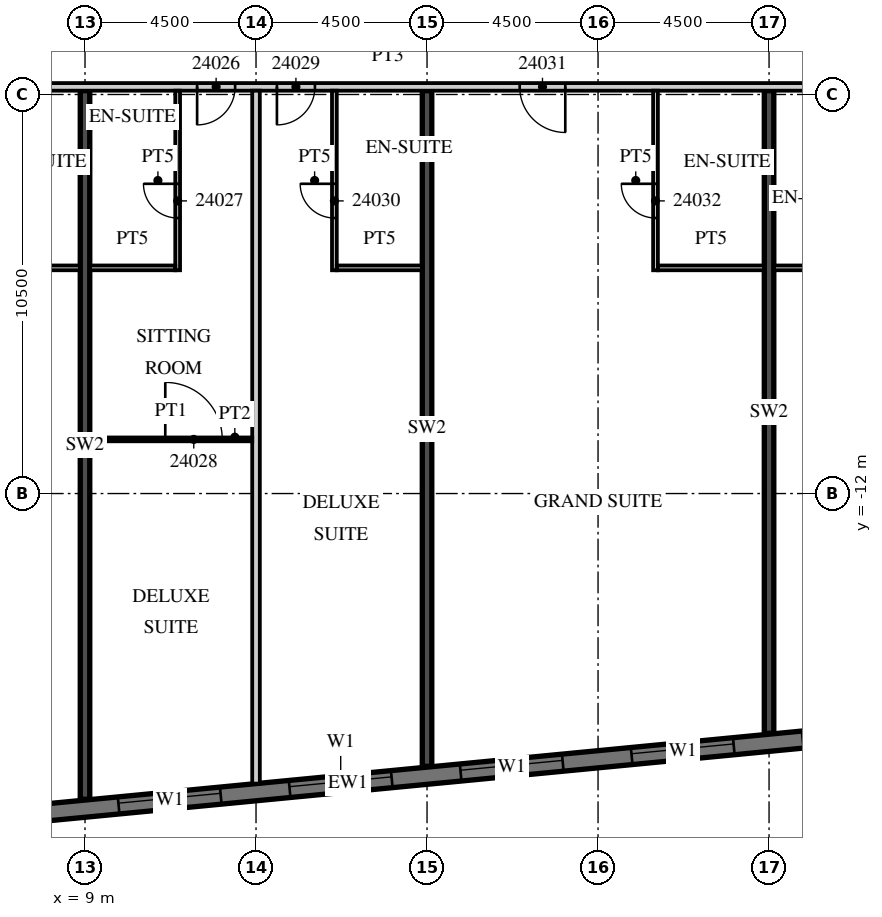
"""IFC4 building model, lengths in metres.
Left out: names, types, materials, properties, quantities, classifications, styles, units other than length and angle.
Written with IfcOpenShell. Run it as: python <this file> out.ifc"""

import sys

from ifc_helpers import new_model, si_unit, direction, frame, frame_2d, origin, place, context, subcontext, project, spatial, rectangle, extrude, element, fill, save


model = new_model("IFC4")
c1 = context("Model", 3, precision=1e-05, world=origin(), true_north=direction((0.0, 1.0)))
c2 = subcontext(c1, "Body", "Model", "MODEL_VIEW")
j1 = project(units=[si_unit("LENGTHUNIT", "METRE"), si_unit("PLANEANGLEUNIT", "RADIAN")], contexts=[c1])
p1 = place(None, origin())
s1 = spatial("IfcSite", under=j1, at=p1, CompositionType="ELEMENT")
p2 = place(p1, origin())
s2 = spatial("IfcBuilding", under=s1, at=p2, CompositionType="ELEMENT")
p3 = place(p2, frame((0.0, 0.0, 114.1)))
s3 = spatial("IfcBuildingStorey", under=s2, at=p3, CompositionType="ELEMENT", Elevation=114.1)
p4 = place(p3, frame((9.0, -20.044, 0.0), z_axis=(0.0, 0.0, 1.0), x_axis=(0.0, 1.0, 0.0)))
e1 = element("IfcWall", 1, at=p4, inside=s3, PredefinedType="SHEAR", context=c2, shape_type="SweptSolid", body=[
    extrude(rectangle(XDim=18.644, YDim=0.25, at=frame_2d((9.322, 0.0))), origin(), (0.0, 0.0, 1.0), 3.3),
])
p5 = place(p3, frame((18.0, -19.177, 0.0), z_axis=(0.0, 0.0, 1.0), x_axis=(0.0, 1.0, 0.0)))
e2 = element("IfcWall", 2, at=p5, inside=s3, PredefinedType="SHEAR", context=c2, shape_type="SweptSolid", body=[
    extrude(rectangle(XDim=17.777, YDim=0.25, at=frame_2d((8.889, 0.0))), origin(), (0.0, 0.0, 1.0), 3.3),
])
p6 = place(p3, frame((27.0, -18.311, 0.0), z_axis=(0.0, 0.0, 1.0), x_axis=(0.0, 1.0, 0.0)))
e3 = element("IfcWall", 3, at=p6, inside=s3, PredefinedType="SHEAR", context=c2, shape_type="SweptSolid", body=[
    extrude(rectangle(XDim=16.911, YDim=0.25, at=frame_2d((8.455, 0.0))), origin(), (0.0, 0.0, 1.0), 3.3),
])
p7 = place(p3, frame((-13.521, -22.46, 0.0), z_axis=(0.0, 0.0, 1.0), x_axis=(0.995396096335, 0.095846812164, 0.0)))
e4 = element("IfcWall", 4, at=p7, inside=s3, PredefinedType="SOLIDWALL", context=c2, shape_type="SweptSolid", body=[
    extrude(rectangle(XDim=59.151, YDim=0.45, at=frame_2d((29.575, 0.0))), origin(), (0.0, 0.0, 1.0), 3.02),
])
p8 = place(p7, frame((0.91, 0.0, 0.45)))
e5 = element("IfcOpeningElement", 5, at=p8, cuts=e4, PredefinedType="OPENING", context=c2, shape_type="SweptSolid", body=[
    extrude(rectangle(XDim=2.7, YDim=2.25, at=frame_2d((1.35, 1.125))), frame((0.0, 0.235, 0.0), z_axis=(0.0, -1.0, 0.0), x_axis=(1.0, 0.0, 0.0)), (0.0, 0.0, 1.0), 0.47),
])
p9 = place(p7, frame((5.431, 0.0, 0.45)))
e6 = element("IfcOpeningElement", 6, at=p9, cuts=e4, PredefinedType="OPENING", context=c2, shape_type="SweptSolid", body=[
    extrude(rectangle(XDim=2.7, YDim=2.25, at=frame_2d((1.35, 1.125))), frame((0.0, 0.235, 0.0), z_axis=(0.0, -1.0, 0.0), x_axis=(1.0, 0.0, 0.0)), (0.0, 0.0, 1.0), 0.47),
])
p10 = place(p7, frame((9.952, 0.0, 0.45)))
e7 = element("IfcOpeningElement", 7, at=p10, cuts=e4, PredefinedType="OPENING", context=c2, shape_type="SweptSolid", body=[
    extrude(rectangle(XDim=2.7, YDim=2.25, at=frame_2d((1.35, 1.125))), frame((0.0, 0.235, 0.0), z_axis=(0.0, -1.0, 0.0), x_axis=(1.0, 0.0, 0.0)), (0.0, 0.0, 1.0), 0.47),
])
p11 = place(p7, frame((14.473, 0.0, 0.45)))
e8 = element("IfcOpeningElement", 8, at=p11, cuts=e4, PredefinedType="OPENING", context=c2, shape_type="SweptSolid", body=[
    extrude(rectangle(XDim=2.7, YDim=2.25, at=frame_2d((1.35, 1.125))), frame((0.0, 0.235, 0.0), z_axis=(0.0, -1.0, 0.0), x_axis=(1.0, 0.0, 0.0)), (0.0, 0.0, 1.0), 0.47),
])
p12 = place(p7, frame((18.994, 0.0, 0.45)))
e9 = element("IfcOpeningElement", 9, at=p12, cuts=e4, PredefinedType="OPENING", context=c2, shape_type="SweptSolid", body=[
    extrude(rectangle(XDim=2.7, YDim=2.25, at=frame_2d((1.35, 1.125))), frame((0.0, 0.235, 0.0), z_axis=(0.0, -1.0, 0.0), x_axis=(1.0, 0.0, 0.0)), (0.0, 0.0, 1.0), 0.47),
])
p13 = place(p7, frame((23.514, 0.0, 0.45)))
e10 = element("IfcOpeningElement", 10, at=p13, cuts=e4, PredefinedType="OPENING", context=c2, shape_type="SweptSolid", body=[
    extrude(rectangle(XDim=2.7, YDim=2.25, at=frame_2d((1.35, 1.125))), frame((0.0, 0.235, 0.0), z_axis=(0.0, -1.0, 0.0), x_axis=(1.0, 0.0, 0.0)), (0.0, 0.0, 1.0), 0.47),
])
p14 = place(p7, frame((28.035, 0.0, 0.45)))
e11 = element("IfcOpeningElement", 11, at=p14, cuts=e4, PredefinedType="OPENING", context=c2, shape_type="SweptSolid", body=[
    extrude(rectangle(XDim=2.7, YDim=2.25, at=frame_2d((1.35, 1.125))), frame((0.0, 0.235, 0.0), z_axis=(0.0, -1.0, 0.0), x_axis=(1.0, 0.0, 0.0)), (0.0, 0.0, 1.0), 0.47),
])
p15 = place(p7, frame((32.556, 0.0, 0.45)))
e12 = element("IfcOpeningElement", 12, at=p15, cuts=e4, PredefinedType="OPENING", context=c2, shape_type="SweptSolid", body=[
    extrude(rectangle(XDim=2.7, YDim=2.25, at=frame_2d((1.35, 1.125))), frame((0.0, 0.235, 0.0), z_axis=(0.0, -1.0, 0.0), x_axis=(1.0, 0.0, 0.0)), (0.0, 0.0, 1.0), 0.47),
])
p16 = place(p7, frame((37.077, 0.0, 0.45)))
e13 = element("IfcOpeningElement", 13, at=p16, cuts=e4, PredefinedType="OPENING", context=c2, shape_type="SweptSolid", body=[
    extrude(rectangle(XDim=2.7, YDim=2.25, at=frame_2d((1.35, 1.125))), frame((0.0, 0.235, 0.0), z_axis=(0.0, -1.0, 0.0), x_axis=(1.0, 0.0, 0.0)), (0.0, 0.0, 1.0), 0.47),
])
p17 = place(p7, frame((41.598, 0.0, 0.45)))
e14 = element("IfcOpeningElement", 14, at=p17, cuts=e4, PredefinedType="OPENING", context=c2, shape_type="SweptSolid", body=[
    extrude(rectangle(XDim=2.7, YDim=2.25, at=frame_2d((1.35, 1.125))), frame((0.0, 0.235, 0.0), z_axis=(0.0, -1.0, 0.0), x_axis=(1.0, 0.0, 0.0)), (0.0, 0.0, 1.0), 0.47),
])
p18 = place(p7, frame((46.118, 0.0, 0.45)))
e15 = element("IfcOpeningElement", 15, at=p18, cuts=e4, PredefinedType="OPENING", context=c2, shape_type="SweptSolid", body=[
    extrude(rectangle(XDim=2.7, YDim=2.25, at=frame_2d((1.35, 1.125))), frame((0.0, 0.235, 0.0), z_axis=(0.0, -1.0, 0.0), x_axis=(1.0, 0.0, 0.0)), (0.0, 0.0, 1.0), 0.47),
])
p19 = place(p7, frame((50.639, 0.0, 0.45)))
e16 = element("IfcOpeningElement", 16, at=p19, cuts=e4, PredefinedType="OPENING", context=c2, shape_type="SweptSolid", body=[
    extrude(rectangle(XDim=2.7, YDim=2.25, at=frame_2d((1.35, 1.125))), frame((0.0, 0.235, 0.0), z_axis=(0.0, -1.0, 0.0), x_axis=(1.0, 0.0, 0.0)), (0.0, 0.0, 1.0), 0.47),
])
p20 = place(p7, frame((55.15, 0.0, 0.45)))
e17 = element("IfcOpeningElement", 17, at=p20, cuts=e4, PredefinedType="OPENING", context=c2, shape_type="SweptSolid", body=[
    extrude(rectangle(XDim=2.7, YDim=2.25, at=frame_2d((1.35, 1.125))), frame((0.0, 0.235, 0.0), z_axis=(0.0, -1.0, 0.0), x_axis=(1.0, 0.0, 0.0)), (0.0, 0.0, 1.0), 0.47),
])
p21 = place(p3, frame((-13.5, -1.3, 0.0), z_axis=(0.0, 0.0, 1.0), x_axis=(1.0, 0.0, 0.0)))
e18 = element("IfcWall", 18, at=p21, inside=s3, PredefinedType="PARTITIONING", context=c2, shape_type="SweptSolid", body=[
    extrude(rectangle(XDim=60.932, YDim=0.2, at=frame_2d((30.466, 0.0))), origin(), (0.0, 0.0, 1.0), 3.02),
])
p22 = place(p21, frame((0.575, 0.0, 0.0)))
e19 = element("IfcOpeningElement", 19, at=p22, cuts=e18, PredefinedType="OPENING", context=c2, shape_type="SweptSolid", body=[
    extrude(rectangle(XDim=1.0, YDim=2.1, at=frame_2d((0.5, 1.05))), frame((0.0, 0.11, 0.0), z_axis=(0.0, -1.0, 0.0), x_axis=(1.0, 0.0, 0.0)), (0.0, 0.0, 1.0), 0.22),
])
p23 = place(p21, frame((5.075, 0.0, 0.0)))
e20 = element("IfcOpeningElement", 20, at=p23, cuts=e18, PredefinedType="OPENING", context=c2, shape_type="SweptSolid", body=[
    extrude(rectangle(XDim=1.0, YDim=2.1, at=frame_2d((0.5, 1.05))), frame((0.0, 0.11, 0.0), z_axis=(0.0, -1.0, 0.0), x_axis=(1.0, 0.0, 0.0)), (0.0, 0.0, 1.0), 0.22),
])
p24 = place(p21, frame((11.925, 0.0, 0.0)))
e21 = element("IfcOpeningElement", 21, at=p24, cuts=e18, PredefinedType="OPENING", context=c2, shape_type="SweptSolid", body=[
    extrude(rectangle(XDim=1.0, YDim=2.1, at=frame_2d((0.5, 1.05))), frame((0.0, 0.11, 0.0), z_axis=(0.0, -1.0, 0.0), x_axis=(1.0, 0.0, 0.0)), (0.0, 0.0, 1.0), 0.22),
])
p25 = place(p21, frame((15.938, 0.0, 0.0)))
e22 = element("IfcOpeningElement", 22, at=p25, cuts=e18, PredefinedType="OPENING", context=c2, shape_type="SweptSolid", body=[
    extrude(rectangle(XDim=1.2, YDim=2.1, at=frame_2d((0.6, 1.05))), frame((0.0, 0.11, 0.0), z_axis=(0.0, -1.0, 0.0), x_axis=(1.0, 0.0, 0.0)), (0.0, 0.0, 1.0), 0.22),
])
p26 = place(p21, frame((25.45, 0.0, 0.0)))
e23 = element("IfcOpeningElement", 23, at=p26, cuts=e18, PredefinedType="OPENING", context=c2, shape_type="SweptSolid", body=[
    extrude(rectangle(XDim=1.0, YDim=2.1, at=frame_2d((0.5, 1.05))), frame((0.0, 0.11, 0.0), z_axis=(0.0, -1.0, 0.0), x_axis=(1.0, 0.0, 0.0)), (0.0, 0.0, 1.0), 0.22),
])
p27 = place(p21, frame((27.55, 0.0, 0.0)))
e24 = element("IfcOpeningElement", 24, at=p27, cuts=e18, PredefinedType="OPENING", context=c2, shape_type="SweptSolid", body=[
    extrude(rectangle(XDim=1.0, YDim=2.1, at=frame_2d((0.5, 1.05))), frame((0.0, 0.11, 0.0), z_axis=(0.0, -1.0, 0.0), x_axis=(1.0, 0.0, 0.0)), (0.0, 0.0, 1.0), 0.22),
])
p28 = place(p21, frame((33.938, 0.0, 0.0)))
e25 = element("IfcOpeningElement", 25, at=p28, cuts=e18, PredefinedType="OPENING", context=c2, shape_type="SweptSolid", body=[
    extrude(rectangle(XDim=1.2, YDim=2.1, at=frame_2d((0.6, 1.05))), frame((0.0, 0.11, 0.0), z_axis=(0.0, -1.0, 0.0), x_axis=(1.0, 0.0, 0.0)), (0.0, 0.0, 1.0), 0.22),
])
p29 = place(p21, frame((45.862, 0.0, 0.0)))
e26 = element("IfcOpeningElement", 26, at=p29, cuts=e18, PredefinedType="OPENING", context=c2, shape_type="SweptSolid", body=[
    extrude(rectangle(XDim=1.2, YDim=2.1, at=frame_2d((0.6, 1.05))), frame((0.0, 0.11, 0.0), z_axis=(0.0, -1.0, 0.0), x_axis=(1.0, 0.0, 0.0)), (0.0, 0.0, 1.0), 0.22),
])
p30 = place(p21, frame((52.425, 0.0, 0.0)))
e27 = element("IfcOpeningElement", 27, at=p30, cuts=e18, PredefinedType="OPENING", context=c2, shape_type="SweptSolid", body=[
    extrude(rectangle(XDim=1.0, YDim=2.1, at=frame_2d((0.5, 1.05))), frame((0.0, 0.11, 0.0), z_axis=(0.0, -1.0, 0.0), x_axis=(1.0, 0.0, 0.0)), (0.0, 0.0, 1.0), 0.22),
])
p31 = place(p21, frame((56.95, 0.0, 0.0)))
e28 = element("IfcOpeningElement", 28, at=p31, cuts=e18, PredefinedType="OPENING", context=c2, shape_type="SweptSolid", body=[
    extrude(rectangle(XDim=1.0, YDim=2.1, at=frame_2d((0.5, 1.05))), frame((0.0, 0.11, 0.0), z_axis=(0.0, -1.0, 0.0), x_axis=(1.0, 0.0, 0.0)), (0.0, 0.0, 1.0), 0.22),
])
p32 = place(p21, frame((59.882, 0.0, 0.0)))
e29 = element("IfcOpeningElement", 29, at=p32, cuts=e18, PredefinedType="OPENING", context=c2, shape_type="SweptSolid", body=[
    extrude(rectangle(XDim=0.9, YDim=2.1, at=frame_2d((0.45, 1.05))), frame((0.0, 0.11, 0.0), z_axis=(0.0, -1.0, 0.0), x_axis=(1.0, 0.0, 0.0)), (0.0, 0.0, 1.0), 0.22),
])
p33 = place(p3, frame((6.075, -6.062, 0.0), z_axis=(0.0, 0.0, 1.0), x_axis=(1.0, 0.0, 0.0)))
e30 = element("IfcWall", 30, at=p33, inside=s3, PredefinedType="PARTITIONING", context=c2, shape_type="SweptSolid", body=[
    extrude(rectangle(XDim=2.8, YDim=0.125, at=frame_2d((1.4, 0.0))), origin(), (0.0, 0.0, 1.0), 3.02),
])
p34 = place(p3, frame((13.5, -19.633, 0.0), z_axis=(0.0, 0.0, 1.0), x_axis=(0.0, 1.0, 0.0)))
e31 = element("IfcWall", 31, at=p34, inside=s3, PredefinedType="PARTITIONING", context=c2, shape_type="SweptSolid", body=[
    extrude(rectangle(XDim=18.233, YDim=0.2, at=frame_2d((9.117, 0.0))), origin(), (0.0, 0.0, 1.0), 3.02),
])
p35 = place(p3, frame((11.438, -6.125, 0.0), z_axis=(0.0, 0.0, 1.0), x_axis=(0.0, 1.0, 0.0)))
e32 = element("IfcWall", 32, at=p35, inside=s3, PredefinedType="PARTITIONING", context=c2, shape_type="SweptSolid", body=[
    extrude(rectangle(XDim=4.725, YDim=0.125, at=frame_2d((2.363, 0.0))), origin(), (0.0, 0.0, 1.0), 3.02),
])
p36 = place(p35, frame((1.375, 0.0, 0.0)))
e33 = element("IfcOpeningElement", 33, at=p36, cuts=e32, PredefinedType="OPENING", context=c2, shape_type="SweptSolid", body=[
    extrude(rectangle(XDim=0.9, YDim=2.1, at=frame_2d((0.45, 1.05))), frame((0.0, 0.073, 0.0), z_axis=(0.0, -1.0, 0.0), x_axis=(1.0, 0.0, 0.0)), (0.0, 0.0, 1.0), 0.145),
])
p37 = place(p3, frame((9.125, -6.062, 0.0), z_axis=(0.0, 0.0, 1.0), x_axis=(1.0, 0.0, 0.0)))
e34 = element("IfcWall", 34, at=p37, inside=s3, PredefinedType="PARTITIONING", context=c2, shape_type="SweptSolid", body=[
    extrude(rectangle(XDim=2.25, YDim=0.125, at=frame_2d((1.125, 0.0))), origin(), (0.0, 0.0, 1.0), 3.02),
])
p38 = place(p3, frame((9.125, -10.575, 0.0), z_axis=(0.0, 0.0, 1.0), x_axis=(1.0, 0.0, 0.0)))
e35 = element("IfcWall", 35, at=p38, inside=s3, PredefinedType="PARTITIONING", context=c2, shape_type="SweptSolid", body=[
    extrude(rectangle(XDim=4.275, YDim=0.1, at=frame_2d((2.137, 0.0))), origin(), (0.0, 0.0, 1.0), 3.02),
])
p39 = place(p38, frame((1.987, 0.0, 0.0)))
e36 = element("IfcOpeningElement", 36, at=p39, cuts=e35, PredefinedType="OPENING", context=c2, shape_type="SweptSolid", body=[
    extrude(rectangle(XDim=1.5, YDim=2.1, at=frame_2d((0.75, 1.05))), frame((0.0, 0.06, 0.0), z_axis=(0.0, -1.0, 0.0), x_axis=(1.0, 0.0, 0.0)), (0.0, 0.0, 1.0), 0.12),
])
p40 = place(p3, frame((15.562, -6.125, 0.0), z_axis=(0.0, 0.0, 1.0), x_axis=(0.0, 1.0, 0.0)))
e37 = element("IfcWall", 37, at=p40, inside=s3, PredefinedType="PARTITIONING", context=c2, shape_type="SweptSolid", body=[
    extrude(rectangle(XDim=4.725, YDim=0.125, at=frame_2d((2.363, 0.0))), origin(), (0.0, 0.0, 1.0), 3.02),
])
p41 = place(p40, frame((1.375, 0.0, 0.0)))
e38 = element("IfcOpeningElement", 38, at=p41, cuts=e37, PredefinedType="OPENING", context=c2, shape_type="SweptSolid", body=[
    extrude(rectangle(XDim=0.9, YDim=2.1, at=frame_2d((0.45, 1.05))), frame((0.0, 0.073, 0.0), z_axis=(0.0, -1.0, 0.0), x_axis=(1.0, 0.0, 0.0)), (0.0, 0.0, 1.0), 0.145),
])
p42 = place(p3, frame((15.625, -6.062, 0.0), z_axis=(0.0, 0.0, 1.0), x_axis=(1.0, 0.0, 0.0)))
e39 = element("IfcWall", 39, at=p42, inside=s3, PredefinedType="PARTITIONING", context=c2, shape_type="SweptSolid", body=[
    extrude(rectangle(XDim=2.25, YDim=0.125, at=frame_2d((1.125, 0.0))), origin(), (0.0, 0.0, 1.0), 3.02),
])
p43 = place(p3, frame((24.012, -6.125, 0.0), z_axis=(0.0, 0.0, 1.0), x_axis=(0.0, 1.0, 0.0)))
e40 = element("IfcWall", 40, at=p43, inside=s3, PredefinedType="PARTITIONING", context=c2, shape_type="SweptSolid", body=[
    extrude(rectangle(XDim=4.725, YDim=0.125, at=frame_2d((2.363, 0.0))), origin(), (0.0, 0.0, 1.0), 3.02),
])
p44 = place(p43, frame((1.375, 0.0, 0.0)))
e41 = element("IfcOpeningElement", 41, at=p44, cuts=e40, PredefinedType="OPENING", context=c2, shape_type="SweptSolid", body=[
    extrude(rectangle(XDim=0.9, YDim=2.1, at=frame_2d((0.45, 1.05))), frame((0.0, 0.073, 0.0), z_axis=(0.0, -1.0, 0.0), x_axis=(1.0, 0.0, 0.0)), (0.0, 0.0, 1.0), 0.145),
])
for number, where, z_axis, x_axis in (
    (42, (24.075, -6.062, 0.0), (0.0, 0.0, 1.0), (1.0, 0.0, 0.0)),
    (43, (27.125, -6.062, 0.0), (0.0, 0.0, 1.0), (1.0, 0.0, 0.0)),
):
    element("IfcWall", number, at=place(p3, frame(where, z_axis=z_axis, x_axis=x_axis)), inside=s3, PredefinedType="PARTITIONING", context=c2, shape_type="SweptSolid", body=[
        extrude(rectangle(XDim=2.8, YDim=0.125, at=frame_2d((1.4, 0.0))), origin(), (0.0, 0.0, 1.0), 3.02),
    ])
p45 = place(p13, origin())
e44 = element("IfcWindow", 44, at=p45, inside=s3, PartitioningType="SINGLE_PANEL", PredefinedType="WINDOW", context=c2, shape_type="SweptSolid", body=[
    extrude(rectangle(XDim=2.7, YDim=2.25, at=frame_2d((1.35, 1.125))), frame((0.0, 0.09, 0.0), z_axis=(0.0, -1.0, 0.0), x_axis=(1.0, 0.0, 0.0)), (0.0, 0.0, 1.0), 0.06),
])
fill(e10, e44)
p46 = place(p14, origin())
e45 = element("IfcWindow", 45, at=p46, inside=s3, PartitioningType="SINGLE_PANEL", PredefinedType="WINDOW", context=c2, shape_type="SweptSolid", body=[
    extrude(rectangle(XDim=2.7, YDim=2.25, at=frame_2d((1.35, 1.125))), frame((0.0, 0.09, 0.0), z_axis=(0.0, -1.0, 0.0), x_axis=(1.0, 0.0, 0.0)), (0.0, 0.0, 1.0), 0.06),
])
fill(e11, e45)
p47 = place(p15, origin())
e46 = element("IfcWindow", 46, at=p47, inside=s3, PartitioningType="SINGLE_PANEL", PredefinedType="WINDOW", context=c2, shape_type="SweptSolid", body=[
    extrude(rectangle(XDim=2.7, YDim=2.25, at=frame_2d((1.35, 1.125))), frame((0.0, 0.09, 0.0), z_axis=(0.0, -1.0, 0.0), x_axis=(1.0, 0.0, 0.0)), (0.0, 0.0, 1.0), 0.06),
])
fill(e12, e46)
p48 = place(p16, origin())
e47 = element("IfcWindow", 47, at=p48, inside=s3, PartitioningType="SINGLE_PANEL", PredefinedType="WINDOW", context=c2, shape_type="SweptSolid", body=[
    extrude(rectangle(XDim=2.7, YDim=2.25, at=frame_2d((1.35, 1.125))), frame((0.0, 0.09, 0.0), z_axis=(0.0, -1.0, 0.0), x_axis=(1.0, 0.0, 0.0)), (0.0, 0.0, 1.0), 0.06),
])
fill(e13, e47)
p49 = place(p26, origin())
e48 = element("IfcDoor", 48, at=p49, inside=s3, OperationType="SINGLE_SWING_LEFT", PredefinedType="DOOR", context=c2, shape_type="SweptSolid", body=[
    extrude(rectangle(XDim=1.0, YDim=2.1, at=frame_2d((0.5, 1.05))), frame((0.0, 0.025, 0.0), z_axis=(0.0, -1.0, 0.0), x_axis=(1.0, 0.0, 0.0)), (0.0, 0.0, 1.0), 0.05),
])
fill(e23, e48)
p50 = place(p36, origin())
e49 = element("IfcDoor", 49, at=p50, inside=s3, OperationType="SINGLE_SWING_RIGHT", PredefinedType="DOOR", context=c2, shape_type="SweptSolid", body=[
    extrude(rectangle(XDim=0.9, YDim=2.1, at=frame_2d((0.45, 1.05))), frame((0.0, 0.025, 0.0), z_axis=(0.0, -1.0, 0.0), x_axis=(1.0, 0.0, 0.0)), (0.0, 0.0, 1.0), 0.05),
])
fill(e33, e49)
p51 = place(p39, origin())
e50 = element("IfcDoor", 50, at=p51, inside=s3, OperationType="SINGLE_SWING_LEFT", PredefinedType="DOOR", context=c2, shape_type="SweptSolid", body=[
    extrude(rectangle(XDim=1.5, YDim=2.1, at=frame_2d((0.75, 1.05))), frame((0.0, 0.025, 0.0), z_axis=(0.0, -1.0, 0.0), x_axis=(1.0, 0.0, 0.0)), (0.0, 0.0, 1.0), 0.05),
])
fill(e36, e50)
p52 = place(p27, origin())
e51 = element("IfcDoor", 51, at=p52, inside=s3, OperationType="SINGLE_SWING_LEFT", PredefinedType="DOOR", context=c2, shape_type="SweptSolid", body=[
    extrude(rectangle(XDim=1.0, YDim=2.1, at=frame_2d((0.5, 1.05))), frame((0.0, 0.025, 0.0), z_axis=(0.0, -1.0, 0.0), x_axis=(1.0, 0.0, 0.0)), (0.0, 0.0, 1.0), 0.05),
])
fill(e24, e51)
p53 = place(p41, origin())
e52 = element("IfcDoor", 52, at=p53, inside=s3, OperationType="SINGLE_SWING_RIGHT", PredefinedType="DOOR", context=c2, shape_type="SweptSolid", body=[
    extrude(rectangle(XDim=0.9, YDim=2.1, at=frame_2d((0.45, 1.05))), frame((0.0, 0.025, 0.0), z_axis=(0.0, -1.0, 0.0), x_axis=(1.0, 0.0, 0.0)), (0.0, 0.0, 1.0), 0.05),
])
fill(e38, e52)
p54 = place(p28, origin())
e53 = element("IfcDoor", 53, at=p54, inside=s3, OperationType="SINGLE_SWING_RIGHT", PredefinedType="DOOR", context=c2, shape_type="SweptSolid", body=[
    extrude(rectangle(XDim=1.2, YDim=2.1, at=frame_2d((0.6, 1.05))), frame((0.0, 0.025, 0.0), z_axis=(0.0, -1.0, 0.0), x_axis=(1.0, 0.0, 0.0)), (0.0, 0.0, 1.0), 0.05),
])
fill(e25, e53)
p55 = place(p44, origin())
e54 = element("IfcDoor", 54, at=p55, inside=s3, OperationType="SINGLE_SWING_RIGHT", PredefinedType="DOOR", context=c2, shape_type="SweptSolid", body=[
    extrude(rectangle(XDim=0.9, YDim=2.1, at=frame_2d((0.45, 1.05))), frame((0.0, 0.025, 0.0), z_axis=(0.0, -1.0, 0.0), x_axis=(1.0, 0.0, 0.0)), (0.0, 0.0, 1.0), 0.05),
])
fill(e41, e54)
save(model, sys.argv[1])
